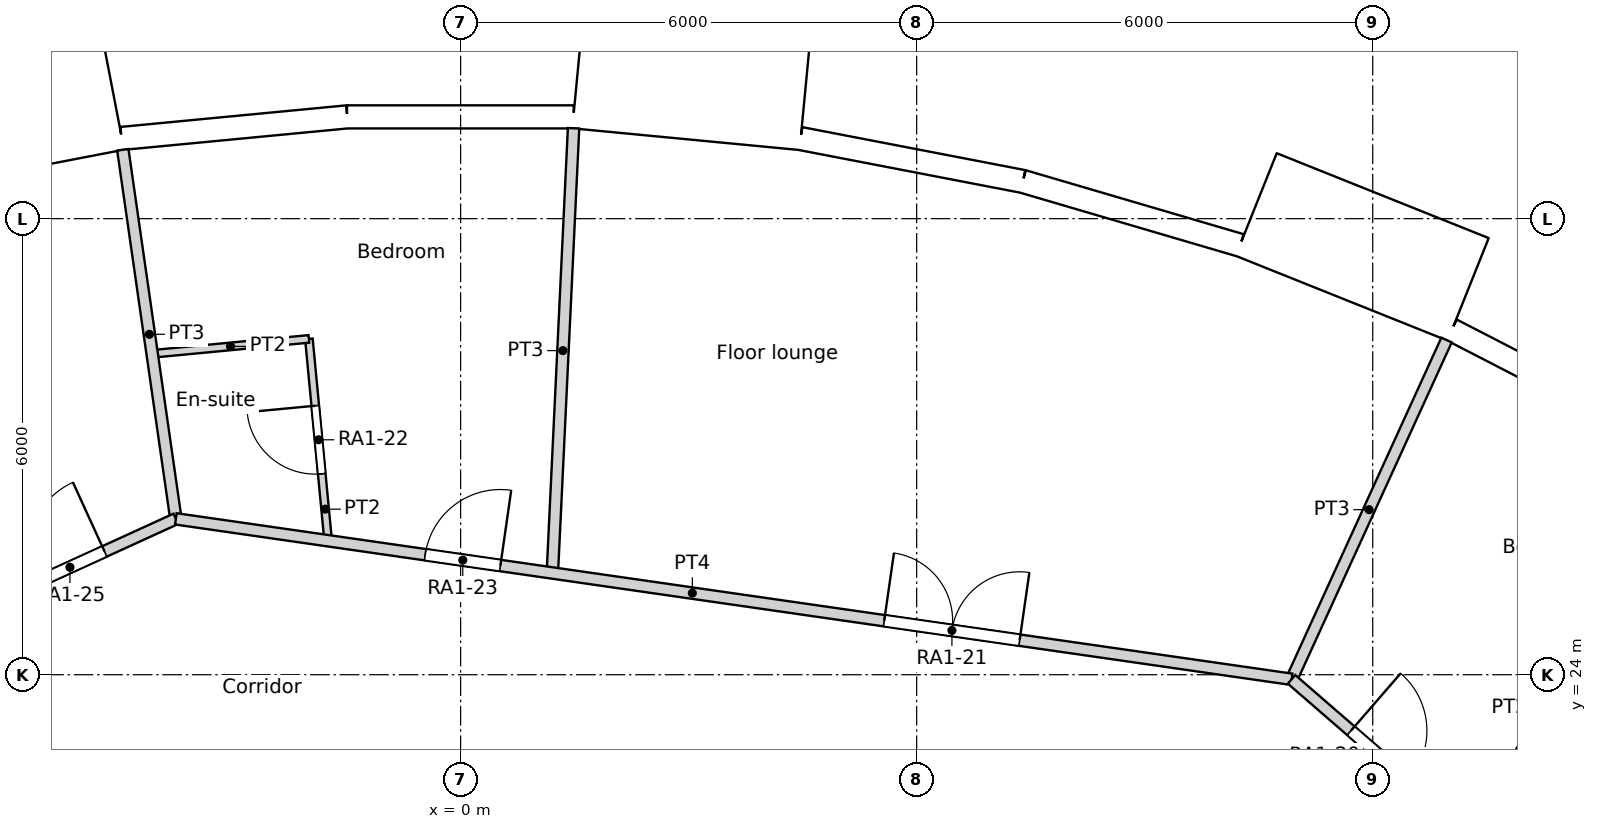
"""IFC4 building model, lengths in metres.
Left out: names, types, materials, properties, quantities, classifications, styles, units other than length and angle.
Written with IfcOpenShell. Run it as: python <this file> out.ifc"""

import sys

from ifc_helpers import new_model, si_unit, direction, frame, frame_2d, origin, origin_2d, place, context, subcontext, project, spatial, rectangle, circle, extrude, element, fill, save


model = new_model("IFC4")
c1 = context("Model", 3, precision=1e-05, world=origin(), true_north=direction((0.0, 1.0)))
c2 = subcontext(c1, "Body", "Model", "MODEL_VIEW")
j1 = project(units=[si_unit("LENGTHUNIT", "METRE"), si_unit("PLANEANGLEUNIT", "RADIAN")], contexts=[c1])
p1 = place(None, origin())
s1 = spatial("IfcSite", under=j1, at=p1, CompositionType="ELEMENT")
p2 = place(p1, origin())
s2 = spatial("IfcBuilding", under=s1, at=p2, CompositionType="ELEMENT")
p3 = place(p2, frame((0.0, 0.0, 28.2)))
s3 = spatial("IfcBuildingStorey", under=s2, at=p3, CompositionType="ELEMENT", Elevation=28.2)
for number, where, z_axis, x_axis in (
    (1, (12.576, 27.539, 0.0), (0.0, 0.0, 1.0), (1.0, 0.0, 0.0)),
    (2, (7.137, 29.421, 0.0), (0.0, 0.0, 1.0), (1.0, 0.0, 0.0)),
    (3, (1.44, 30.24, 0.0), (0.0, 0.0, 1.0), (1.0, 0.0, 0.0)),
    (4, (-4.309, 29.966, 0.0), (0.0, 0.0, 1.0), (1.0, 0.0, 0.0)),
):
    element("IfcColumn", number, at=place(p3, frame(where, z_axis=z_axis, x_axis=x_axis)), inside=s3, PredefinedType="COLUMN", context=c2, shape_type="SweptSolid", body=[
        extrude(circle(Radius=0.7, at=origin_2d()), origin(), (0.0, 0.0, 1.0), 3.6),
    ])
for number, where, z_axis, x_axis in (
    (5, (9.723, 22.54, 0.0), (0.0, 0.0, 1.0), (1.0, 0.0, 0.0)),
    (6, (4.263, 24.175, 0.0), (0.0, 0.0, 1.0), (1.0, 0.0, 0.0)),
    (7, (-1.427, 24.506, 0.0), (0.0, 0.0, 1.0), (1.0, 0.0, 0.0)),
):
    element("IfcColumn", number, at=place(p3, frame(where, z_axis=z_axis, x_axis=x_axis)), inside=s3, PredefinedType="COLUMN", context=c2, shape_type="SweptSolid", body=[
        extrude(circle(Radius=0.75, at=origin_2d()), origin(), (0.0, 0.0, 1.0), 3.6),
    ])
p4 = place(p3, frame((15.687, 27.171, 0.0), z_axis=(0.0, 0.0, 1.0), x_axis=(-0.888853225096, 0.4581920386, 0.0)))
e8 = element("IfcWall", 8, at=p4, inside=s3, PredefinedType="SOLIDWALL", context=c2, shape_type="SweptSolid", body=[
    extrude(rectangle(XDim=2.979, YDim=0.3, at=frame_2d((1.49, 0.0))), origin(), (0.0, 0.0, 1.0), 3.15),
])
p5 = place(p4, frame((1.49, 0.0, 1.55)))
e9 = element("IfcOpeningElement", 9, at=p5, cuts=e8, PredefinedType="OPENING", context=c2, shape_type="SweptSolid", body=[
    extrude(circle(Radius=0.9, at=origin_2d()), frame((0.0, 0.16, 0.0), z_axis=(0.0, -1.0, 0.0), x_axis=(1.0, 0.0, 0.0)), (0.0, 0.0, 1.0), 0.32),
])
p6 = place(p3, frame((13.254, 29.07, -0.45), z_axis=(0.0, 0.0, 1.0), x_axis=(-0.928358776184, 0.371685327504, 0.0)))
e10 = element("IfcWall", 10, at=p6, inside=s3, PredefinedType="ELEMENTEDWALL", context=c2, shape_type="SweptSolid", body=[
    extrude(rectangle(XDim=3.0, YDim=1.45, at=frame_2d((1.5, 0.0))), origin(), (0.0, 0.0, 1.0), 3.6),
])
p7 = place(p6, frame((1.5, 0.0, 2.0)))
e11 = element("IfcOpeningElement", 11, at=p7, cuts=e10, PredefinedType="OPENING", context=c2, shape_type="SweptSolid", body=[
    extrude(circle(Radius=0.9, at=origin_2d()), frame((0.0, 0.735, 0.0), z_axis=(0.0, -1.0, 0.0), x_axis=(1.0, 0.0, 0.0)), (0.0, 0.0, 1.0), 1.47),
])
p8 = place(p3, frame((10.256, 29.651, 0.0), z_axis=(0.0, 0.0, 1.0), x_axis=(-0.959507586834, 0.28168278401, 0.0)))
e12 = element("IfcWall", 12, at=p8, inside=s3, PredefinedType="SOLIDWALL", context=c2, shape_type="SweptSolid", body=[
    extrude(rectangle(XDim=2.98, YDim=0.3, at=frame_2d((1.49, 0.0))), origin(), (0.0, 0.0, 1.0), 3.15),
])
p9 = place(p8, frame((1.49, 0.0, 1.55)))
e13 = element("IfcOpeningElement", 13, at=p9, cuts=e12, PredefinedType="OPENING", context=c2, shape_type="SweptSolid", body=[
    extrude(circle(Radius=0.9, at=origin_2d()), frame((0.0, 0.16, 0.0), z_axis=(0.0, -1.0, 0.0), x_axis=(1.0, 0.0, 0.0)), (0.0, 0.0, 1.0), 0.32),
])
p10 = place(p3, frame((7.397, 30.49, 0.0), z_axis=(0.0, 0.0, 1.0), x_axis=(-0.981924535406, 0.189272836848, 0.0)))
e14 = element("IfcWall", 14, at=p10, inside=s3, PredefinedType="SOLIDWALL", context=c2, shape_type="SweptSolid", body=[
    extrude(rectangle(XDim=2.98, YDim=0.3, at=frame_2d((1.49, 0.0))), origin(), (0.0, 0.0, 1.0), 3.15),
])
p11 = place(p10, frame((1.49, 0.0, 1.55)))
e15 = element("IfcOpeningElement", 15, at=p11, cuts=e14, PredefinedType="OPENING", context=c2, shape_type="SweptSolid", body=[
    extrude(circle(Radius=0.9, at=origin_2d()), frame((0.0, 0.16, 0.0), z_axis=(0.0, -1.0, 0.0), x_axis=(1.0, 0.0, 0.0)), (0.0, 0.0, 1.0), 0.32),
])
p12 = place(p3, frame((4.527, 31.627, -0.45), z_axis=(0.0, 0.0, 1.0), x_axis=(-0.995472768558, 0.09504718333, 0.0)))
e16 = element("IfcWall", 16, at=p12, inside=s3, PredefinedType="ELEMENTEDWALL", context=c2, shape_type="SweptSolid", body=[
    extrude(rectangle(XDim=3.0, YDim=1.45, at=frame_2d((1.5, 0.0))), origin(), (0.0, 0.0, 1.0), 3.6),
])
p13 = place(p12, frame((1.5, 0.0, 2.0)))
e17 = element("IfcOpeningElement", 17, at=p13, cuts=e16, PredefinedType="OPENING", context=c2, shape_type="SweptSolid", body=[
    extrude(circle(Radius=0.9, at=origin_2d()), frame((0.0, 0.735, 0.0), z_axis=(0.0, -1.0, 0.0), x_axis=(1.0, 0.0, 0.0)), (0.0, 0.0, 1.0), 1.47),
])
p14 = place(p3, frame((1.487, 31.339, 0.0), z_axis=(0.0, 0.0, 1.0), x_axis=(-1.0, 0.0, 0.0)))
e18 = element("IfcWall", 18, at=p14, inside=s3, PredefinedType="SOLIDWALL", context=c2, shape_type="SweptSolid", body=[
    extrude(rectangle(XDim=2.98, YDim=0.3, at=frame_2d((1.49, 0.0))), origin(), (0.0, 0.0, 1.0), 3.15),
])
p15 = place(p14, frame((1.49, 0.0, 1.55)))
e19 = element("IfcOpeningElement", 19, at=p15, cuts=e18, PredefinedType="OPENING", context=c2, shape_type="SweptSolid", body=[
    extrude(circle(Radius=0.9, at=origin_2d()), frame((0.0, 0.16, 0.0), z_axis=(0.0, -1.0, 0.0), x_axis=(1.0, 0.0, 0.0)), (0.0, 0.0, 1.0), 0.32),
])
p16 = place(p3, frame((-1.493, 31.339, 0.0), z_axis=(0.0, 0.0, 1.0), x_axis=(-0.995472611385, -0.095048829468, 0.0)))
e20 = element("IfcWall", 20, at=p16, inside=s3, PredefinedType="SOLIDWALL", context=c2, shape_type="SweptSolid", body=[
    extrude(rectangle(XDim=2.979, YDim=0.3, at=frame_2d((1.49, 0.0))), origin(), (0.0, 0.0, 1.0), 3.15),
])
p17 = place(p16, frame((1.49, 0.0, 1.55)))
e21 = element("IfcOpeningElement", 21, at=p17, cuts=e20, PredefinedType="OPENING", context=c2, shape_type="SweptSolid", body=[
    extrude(circle(Radius=0.9, at=origin_2d()), frame((0.0, 0.16, 0.0), z_axis=(0.0, -1.0, 0.0), x_axis=(1.0, 0.0, 0.0)), (0.0, 0.0, 1.0), 0.32),
])
p18 = place(p3, frame((-4.567, 31.621, -0.45), z_axis=(0.0, 0.0, 1.0), x_axis=(-0.981921602273, -0.189288052949, 0.0)))
e22 = element("IfcWall", 22, at=p18, inside=s3, PredefinedType="ELEMENTEDWALL", context=c2, shape_type="SweptSolid", body=[
    extrude(rectangle(XDim=3.0, YDim=1.45, at=frame_2d((1.5, 0.0))), origin(), (0.0, 0.0, 1.0), 3.6),
])
p19 = place(p18, frame((1.5, 0.0, 2.0)))
e23 = element("IfcOpeningElement", 23, at=p19, cuts=e22, PredefinedType="OPENING", context=c2, shape_type="SweptSolid", body=[
    extrude(circle(Radius=0.9, at=origin_2d()), frame((0.0, 0.735, 0.0), z_axis=(0.0, -1.0, 0.0), x_axis=(1.0, 0.0, 0.0)), (0.0, 0.0, 1.0), 1.47),
])
p20 = place(p3, frame((10.932, 23.939, 0.0), z_axis=(0.0, 0.0, 1.0), x_axis=(0.755838982892, -0.654757536757, 0.0)))
e24 = element("IfcWall", 24, at=p20, inside=s3, PredefinedType="PARTITIONING", context=c2, shape_type="SweptSolid", body=[
    extrude(rectangle(XDim=14.83, YDim=0.15, at=frame_2d((7.415, 0.0))), origin(), (0.0, 0.0, 1.0), 3.15),
])
p21 = place(p20, frame((12.796, 0.0, 0.0)))
e25 = element("IfcOpeningElement", 25, at=p21, cuts=e24, PredefinedType="OPENING", context=c2, shape_type="SweptSolid", body=[
    extrude(rectangle(XDim=1.0, YDim=2.1, at=frame_2d((0.5, 1.05))), frame((0.0, 0.075, 0.0), z_axis=(0.0, -1.0, 0.0), x_axis=(1.0, 0.0, 0.0)), (0.0, 0.0, 1.0), 0.15),
])
p22 = place(p20, frame((7.572, 0.0, 0.0)))
e26 = element("IfcOpeningElement", 26, at=p22, cuts=e24, PredefinedType="OPENING", context=c2, shape_type="SweptSolid", body=[
    extrude(rectangle(XDim=1.0, YDim=2.1, at=frame_2d((0.5, 1.05))), frame((0.0, 0.075, 0.0), z_axis=(0.0, -1.0, 0.0), x_axis=(1.0, 0.0, 0.0)), (0.0, 0.0, 1.0), 0.15),
])
p23 = place(p20, frame((1.033, 0.0, 0.0)))
e27 = element("IfcOpeningElement", 27, at=p23, cuts=e24, PredefinedType="OPENING", context=c2, shape_type="SweptSolid", body=[
    extrude(rectangle(XDim=1.0, YDim=2.1, at=frame_2d((0.5, 1.05))), frame((0.0, 0.075, 0.0), z_axis=(0.0, -1.0, 0.0), x_axis=(1.0, 0.0, 0.0)), (0.0, 0.0, 1.0), 0.15),
])
p24 = place(p3, frame((-3.746, 26.051, 0.0), z_axis=(0.0, 0.0, 1.0), x_axis=(0.989821009857, -0.142317843033, 0.0)))
e28 = element("IfcWall", 28, at=p24, inside=s3, PredefinedType="PARTITIONING", context=c2, shape_type="SweptSolid", body=[
    extrude(rectangle(XDim=14.83, YDim=0.15, at=frame_2d((7.415, 0.0))), origin(), (0.0, 0.0, 1.0), 3.15),
])
p25 = place(p24, frame((9.415, 0.0, 0.0)))
e29 = element("IfcOpeningElement", 29, at=p25, cuts=e28, PredefinedType="OPENING", context=c2, shape_type="SweptSolid", body=[
    extrude(rectangle(XDim=1.8, YDim=2.1, at=frame_2d((0.9, 1.05))), frame((0.0, 0.075, 0.0), z_axis=(0.0, -1.0, 0.0), x_axis=(1.0, 0.0, 0.0)), (0.0, 0.0, 1.0), 0.15),
])
p26 = place(p24, frame((3.314, 0.0, 0.0)))
e30 = element("IfcOpeningElement", 30, at=p26, cuts=e28, PredefinedType="OPENING", context=c2, shape_type="SweptSolid", body=[
    extrude(rectangle(XDim=1.0, YDim=2.1, at=frame_2d((0.5, 1.05))), frame((0.0, 0.075, 0.0), z_axis=(0.0, -1.0, 0.0), x_axis=(1.0, 0.0, 0.0)), (0.0, 0.0, 1.0), 0.15),
])
p27 = place(p3, frame((-17.234, 19.888, 0.0), z_axis=(0.0, 0.0, 1.0), x_axis=(0.90953867323, 0.415619299238, 0.0)))
e31 = element("IfcWall", 31, at=p27, inside=s3, PredefinedType="PARTITIONING", context=c2, shape_type="SweptSolid", body=[
    extrude(rectangle(XDim=14.829, YDim=0.15, at=frame_2d((7.415, 0.0))), origin(), (0.0, 0.0, 1.0), 3.15),
])
p28 = place(p27, frame((12.797, 0.0, 0.0)))
e32 = element("IfcOpeningElement", 32, at=p28, cuts=e31, PredefinedType="OPENING", context=c2, shape_type="SweptSolid", body=[
    extrude(rectangle(XDim=1.0, YDim=2.1, at=frame_2d((0.5, 1.05))), frame((0.0, 0.075, 0.0), z_axis=(0.0, -1.0, 0.0), x_axis=(1.0, 0.0, 0.0)), (0.0, 0.0, 1.0), 0.15),
])
p29 = place(p27, frame((7.877, 0.0, 0.0)))
e33 = element("IfcOpeningElement", 33, at=p29, cuts=e31, PredefinedType="OPENING", context=c2, shape_type="SweptSolid", body=[
    extrude(rectangle(XDim=1.0, YDim=2.1, at=frame_2d((0.5, 1.05))), frame((0.0, 0.075, 0.0), z_axis=(0.0, -1.0, 0.0), x_axis=(1.0, 0.0, 0.0)), (0.0, 0.0, 1.0), 0.15),
])
p30 = place(p27, frame((1.034, 0.0, 0.0)))
e34 = element("IfcOpeningElement", 34, at=p30, cuts=e31, PredefinedType="OPENING", context=c2, shape_type="SweptSolid", body=[
    extrude(rectangle(XDim=1.0, YDim=2.1, at=frame_2d((0.5, 1.05))), frame((0.0, 0.075, 0.0), z_axis=(0.0, -1.0, 0.0), x_axis=(1.0, 0.0, 0.0)), (0.0, 0.0, 1.0), 0.15),
])
p31 = place(p3, frame((13.248, 21.935, 0.0), z_axis=(0.0, 0.0, 1.0), x_axis=(0.540597960994, 0.841281073464, 0.0)))
e35 = element("IfcWall", 35, at=p31, inside=s3, PredefinedType="PARTITIONING", context=c2, shape_type="SweptSolid", body=[
    extrude(rectangle(XDim=2.242, YDim=0.1, at=frame_2d((1.121, 0.0))), origin(), (0.0, 0.0, 1.0), 3.15),
])
p32 = place(p31, frame((0.671, 0.0, 0.0)))
e36 = element("IfcOpeningElement", 36, at=p32, cuts=e35, PredefinedType="OPENING", context=c2, shape_type="SweptSolid", body=[
    extrude(rectangle(XDim=0.9, YDim=2.04, at=frame_2d((0.45, 1.02))), frame((0.0, 0.05, 0.0), z_axis=(0.0, -1.0, 0.0), x_axis=(1.0, 0.0, 0.0)), (0.0, 0.0, 1.0), 0.1),
])
p33 = place(p3, frame((10.933, 23.94, 0.0), z_axis=(0.0, 0.0, 1.0), x_axis=(0.415346954488, 0.909663073559, 0.0)))
e37 = element("IfcWall", 37, at=p33, inside=s3, PredefinedType="PARTITIONING", context=c2, shape_type="SweptSolid", body=[
    extrude(rectangle(XDim=4.906, YDim=0.15, at=frame_2d((2.453, 0.0))), origin(), (0.0, 0.0, 1.0), 3.15),
])
p34 = place(p3, frame((1.207, 25.339, 0.0), z_axis=(0.0, 0.0, 1.0), x_axis=(0.047648334785, 0.998864173045, 0.0)))
e38 = element("IfcWall", 38, at=p34, inside=s3, PredefinedType="PARTITIONING", context=c2, shape_type="SweptSolid", body=[
    extrude(rectangle(XDim=5.856, YDim=0.15, at=frame_2d((2.928, 0.0))), origin(), (0.0, 0.0, 1.0), 3.15),
])
p35 = place(p3, frame((-1.996, 28.418, 0.0), z_axis=(0.0, 0.0, 1.0), x_axis=(0.094925726797, -0.995484357683, 0.0)))
e39 = element("IfcWall", 39, at=p35, inside=s3, PredefinedType="PARTITIONING", context=c2, shape_type="SweptSolid", body=[
    extrude(rectangle(XDim=2.667, YDim=0.1, at=frame_2d((1.333, 0.0))), origin(), (0.0, 0.0, 1.0), 3.15),
])
p36 = place(p35, frame((0.883, 0.0, 0.0)))
e40 = element("IfcOpeningElement", 40, at=p36, cuts=e39, PredefinedType="OPENING", context=c2, shape_type="SweptSolid", body=[
    extrude(rectangle(XDim=0.9, YDim=2.04, at=frame_2d((0.45, 1.02))), frame((0.0, 0.05, 0.0), z_axis=(0.0, -1.0, 0.0), x_axis=(1.0, 0.0, 0.0)), (0.0, 0.0, 1.0), 0.1),
])
p37 = place(p3, frame((-4.058, 28.221, 0.0), z_axis=(0.0, 0.0, 1.0), x_axis=(0.995466291052, 0.095115000814, 0.0)))
e41 = element("IfcWall", 41, at=p37, inside=s3, PredefinedType="PARTITIONING", context=c2, shape_type="SweptSolid", body=[
    extrude(rectangle(XDim=2.071, YDim=0.1, at=frame_2d((1.036, 0.0))), origin(), (0.0, 0.0, 1.0), 3.15),
])
p38 = place(p3, frame((-4.444, 30.906, 0.0), z_axis=(0.0, 0.0, 1.0), x_axis=(0.142306296561, -0.989822669956, 0.0)))
e42 = element("IfcWall", 42, at=p38, inside=s3, PredefinedType="PARTITIONING", context=c2, shape_type="SweptSolid", body=[
    extrude(rectangle(XDim=4.905, YDim=0.15, at=frame_2d((2.452, 0.0))), origin(), (0.0, 0.0, 1.0), 3.15),
])
p39 = place(p5, origin())
e43 = element("IfcWindow", 43, at=p39, inside=s3, PartitioningType="SINGLE_PANEL", PredefinedType="WINDOW", context=c2, shape_type="SweptSolid", body=[
    extrude(circle(Radius=0.9, at=origin_2d()), frame((0.0, 0.12, 0.0), z_axis=(0.0, -1.0, 0.0), x_axis=(1.0, 0.0, 0.0)), (0.0, 0.0, 1.0), 0.1),
])
fill(e9, e43)
p40 = place(p7, origin())
e44 = element("IfcWindow", 44, at=p40, inside=s3, PartitioningType="SINGLE_PANEL", PredefinedType="WINDOW", context=c2, shape_type="SweptSolid", body=[
    extrude(circle(Radius=0.9, at=origin_2d()), frame((0.0, 0.695, 0.0), z_axis=(0.0, -1.0, 0.0), x_axis=(1.0, 0.0, 0.0)), (0.0, 0.0, 1.0), 0.1),
])
fill(e11, e44)
p41 = place(p9, origin())
e45 = element("IfcWindow", 45, at=p41, inside=s3, PartitioningType="SINGLE_PANEL", PredefinedType="WINDOW", context=c2, shape_type="SweptSolid", body=[
    extrude(circle(Radius=0.9, at=origin_2d()), frame((0.0, 0.12, 0.0), z_axis=(0.0, -1.0, 0.0), x_axis=(1.0, 0.0, 0.0)), (0.0, 0.0, 1.0), 0.1),
])
fill(e13, e45)
p42 = place(p11, origin())
e46 = element("IfcWindow", 46, at=p42, inside=s3, PartitioningType="SINGLE_PANEL", PredefinedType="WINDOW", context=c2, shape_type="SweptSolid", body=[
    extrude(circle(Radius=0.9, at=origin_2d()), frame((0.0, 0.12, 0.0), z_axis=(0.0, -1.0, 0.0), x_axis=(1.0, 0.0, 0.0)), (0.0, 0.0, 1.0), 0.1),
])
fill(e15, e46)
p43 = place(p13, origin())
e47 = element("IfcWindow", 47, at=p43, inside=s3, PartitioningType="SINGLE_PANEL", PredefinedType="WINDOW", context=c2, shape_type="SweptSolid", body=[
    extrude(circle(Radius=0.9, at=origin_2d()), frame((0.0, 0.695, 0.0), z_axis=(0.0, -1.0, 0.0), x_axis=(1.0, 0.0, 0.0)), (0.0, 0.0, 1.0), 0.1),
])
fill(e17, e47)
p44 = place(p15, origin())
e48 = element("IfcWindow", 48, at=p44, inside=s3, PartitioningType="SINGLE_PANEL", PredefinedType="WINDOW", context=c2, shape_type="SweptSolid", body=[
    extrude(circle(Radius=0.9, at=origin_2d()), frame((0.0, 0.12, 0.0), z_axis=(0.0, -1.0, 0.0), x_axis=(1.0, 0.0, 0.0)), (0.0, 0.0, 1.0), 0.1),
])
fill(e19, e48)
p45 = place(p17, origin())
e49 = element("IfcWindow", 49, at=p45, inside=s3, PartitioningType="SINGLE_PANEL", PredefinedType="WINDOW", context=c2, shape_type="SweptSolid", body=[
    extrude(circle(Radius=0.9, at=origin_2d()), frame((0.0, 0.12, 0.0), z_axis=(0.0, -1.0, 0.0), x_axis=(1.0, 0.0, 0.0)), (0.0, 0.0, 1.0), 0.1),
])
fill(e21, e49)
p46 = place(p19, origin())
e50 = element("IfcWindow", 50, at=p46, inside=s3, PartitioningType="SINGLE_PANEL", PredefinedType="WINDOW", context=c2, shape_type="SweptSolid", body=[
    extrude(circle(Radius=0.9, at=origin_2d()), frame((0.0, 0.695, 0.0), z_axis=(0.0, -1.0, 0.0), x_axis=(1.0, 0.0, 0.0)), (0.0, 0.0, 1.0), 0.1),
])
fill(e23, e50)
p47 = place(p32, origin())
e51 = element("IfcDoor", 51, at=p47, inside=s3, OperationType="SINGLE_SWING_RIGHT", PredefinedType="DOOR", context=c2, shape_type="SweptSolid", body=[
    extrude(rectangle(XDim=0.9, YDim=2.04, at=frame_2d((0.45, 1.02))), frame((0.0, 0.025, 0.0), z_axis=(0.0, -1.0, 0.0), x_axis=(1.0, 0.0, 0.0)), (0.0, 0.0, 1.0), 0.05),
])
fill(e36, e51)
p48 = place(p23, origin())
e52 = element("IfcDoor", 52, at=p48, inside=s3, OperationType="SINGLE_SWING_LEFT", PredefinedType="DOOR", context=c2, shape_type="SweptSolid", body=[
    extrude(rectangle(XDim=1.0, YDim=2.1, at=frame_2d((0.5, 1.05))), frame((0.0, 0.025, 0.0), z_axis=(0.0, -1.0, 0.0), x_axis=(1.0, 0.0, 0.0)), (0.0, 0.0, 1.0), 0.05),
])
fill(e27, e52)
p49 = place(p25, origin())
e53 = element("IfcDoor", 53, at=p49, inside=s3, OperationType="DOUBLE_DOOR_SINGLE_SWING", PredefinedType="DOOR", context=c2, shape_type="SweptSolid", body=[
    extrude(rectangle(XDim=1.8, YDim=2.1, at=frame_2d((0.9, 1.05))), frame((0.0, 0.025, 0.0), z_axis=(0.0, -1.0, 0.0), x_axis=(1.0, 0.0, 0.0)), (0.0, 0.0, 1.0), 0.05),
])
fill(e29, e53)
p50 = place(p36, origin())
e54 = element("IfcDoor", 54, at=p50, inside=s3, OperationType="SINGLE_SWING_RIGHT", PredefinedType="DOOR", context=c2, shape_type="SweptSolid", body=[
    extrude(rectangle(XDim=0.9, YDim=2.04, at=frame_2d((0.45, 1.02))), frame((0.0, 0.025, 0.0), z_axis=(0.0, -1.0, 0.0), x_axis=(1.0, 0.0, 0.0)), (0.0, 0.0, 1.0), 0.05),
])
fill(e40, e54)
p51 = place(p26, origin())
e55 = element("IfcDoor", 55, at=p51, inside=s3, OperationType="SINGLE_SWING_RIGHT", PredefinedType="DOOR", context=c2, shape_type="SweptSolid", body=[
    extrude(rectangle(XDim=1.0, YDim=2.1, at=frame_2d((0.5, 1.05))), frame((0.0, 0.025, 0.0), z_axis=(0.0, -1.0, 0.0), x_axis=(1.0, 0.0, 0.0)), (0.0, 0.0, 1.0), 0.05),
])
fill(e30, e55)
p52 = place(p28, origin())
e56 = element("IfcDoor", 56, at=p52, inside=s3, OperationType="SINGLE_SWING_RIGHT", PredefinedType="DOOR", context=c2, shape_type="SweptSolid", body=[
    extrude(rectangle(XDim=1.0, YDim=2.1, at=frame_2d((0.5, 1.05))), frame((0.0, 0.025, 0.0), z_axis=(0.0, -1.0, 0.0), x_axis=(1.0, 0.0, 0.0)), (0.0, 0.0, 1.0), 0.05),
])
fill(e32, e56)
save(model, sys.argv[1])
